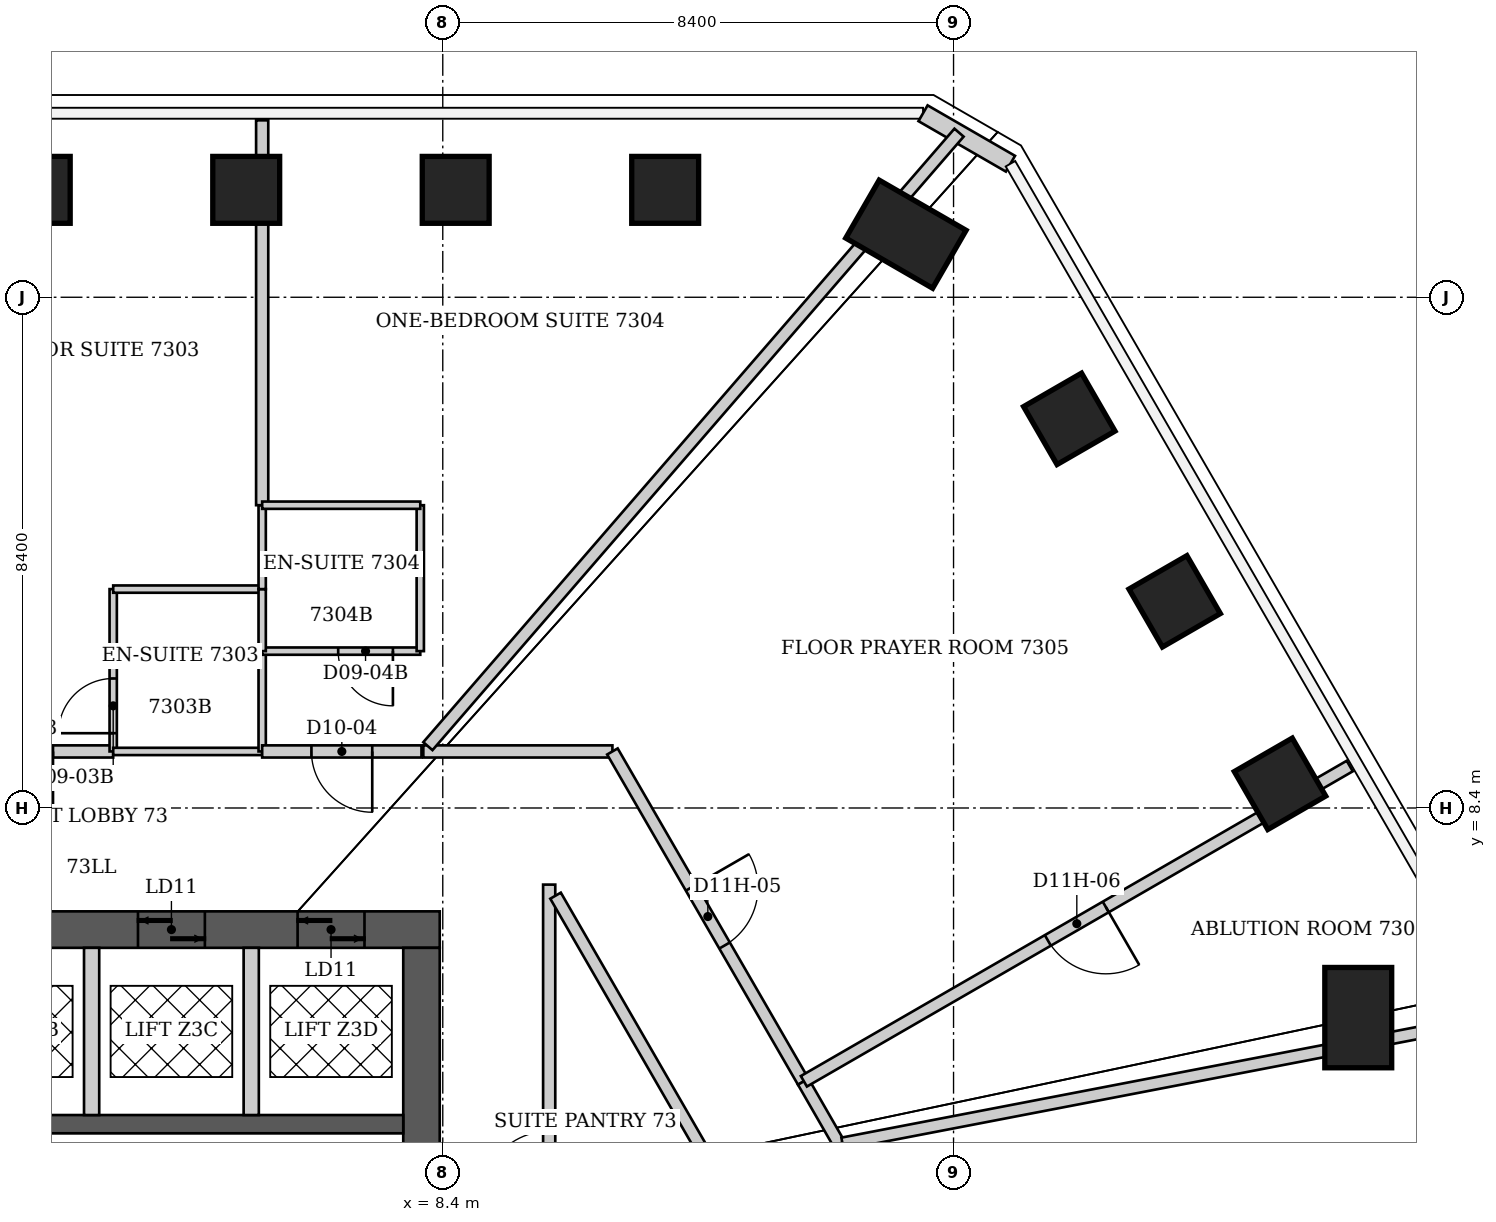
"""IFC4 building model, lengths in metres.
Left out: names, types, materials, properties, quantities, classifications, styles, units other than length and angle.
Written with IfcOpenShell. Run it as: python <this file> out.ifc"""

import sys

from ifc_helpers import new_model, si_unit, direction, frame, frame_2d, origin, origin_2d, place, context, subcontext, project, spatial, rectangle, extrude, element, fill, save


model = new_model("IFC4")
c1 = context("Model", 3, precision=1e-05, world=origin(), true_north=direction((0.0, 1.0)))
c2 = subcontext(c1, "Body", "Model", "MODEL_VIEW")
j1 = project(units=[si_unit("LENGTHUNIT", "METRE"), si_unit("PLANEANGLEUNIT", "RADIAN")], contexts=[c1])
p1 = place(None, origin())
s1 = spatial("IfcSite", under=j1, at=p1, CompositionType="ELEMENT")
p2 = place(p1, origin())
s2 = spatial("IfcBuilding", under=s1, at=p2, CompositionType="ELEMENT")
p3 = place(p2, frame((0.0, 0.0, 291.2)))
s3 = spatial("IfcBuildingStorey", under=s2, at=p3, CompositionType="ELEMENT", Elevation=291.2)
for number, where, z_axis, x_axis in (
    (1, (1.722, 18.566, 0.0), (0.0, 0.0, 1.0), (0.0, 1.0, 0.0)),
    (2, (5.167, 18.566, 0.0), (0.0, 0.0, 1.0), (0.0, 1.0, 0.0)),
    (3, (8.613, 18.566, 0.0), (0.0, 0.0, 1.0), (0.0, 1.0, 0.0)),
    (4, (12.058, 18.566, 0.0), (0.0, 0.0, 1.0), (0.0, 1.0, 0.0)),
):
    element("IfcColumn", number, at=place(p3, frame(where, z_axis=z_axis, x_axis=x_axis)), inside=s3, PredefinedType="COLUMN", context=c2, shape_type="SweptSolid", body=[
        extrude(rectangle(XDim=1.1, YDim=1.1, at=origin_2d()), origin(), (0.0, 0.0, 1.0), 3.8),
    ])
p4 = place(p3, frame((16.017, 17.837, 0.0), z_axis=(0.0, 0.0, 1.0), x_axis=(0.5, 0.866025403784, 0.0)))
e5 = element("IfcColumn", 5, at=p4, inside=s3, PredefinedType="COLUMN", context=c2, shape_type="SweptSolid", body=[
    extrude(rectangle(XDim=1.1, YDim=1.65, at=origin_2d()), origin(), (0.0, 0.0, 1.0), 3.8),
])
for number, where, z_axis, x_axis in (
    (6, (18.704, 14.8, 0.0), (0.0, 0.0, 1.0), (0.866, 0.5, 0.0)),
    (7, (20.437, 11.799, 0.0), (0.0, 0.0, 1.0), (0.866, 0.5, 0.0)),
    (8, (22.169, 8.798, 0.0), (0.0, 0.0, 1.0), (0.866, 0.5, 0.0)),
):
    element("IfcColumn", number, at=place(p3, frame(where, z_axis=z_axis, x_axis=x_axis)), inside=s3, PredefinedType="COLUMN", context=c2, shape_type="SweptSolid", body=[
        extrude(rectangle(XDim=1.1, YDim=1.1, at=origin_2d()), origin(), (0.0, 0.0, 1.0), 3.8),
    ])
p5 = place(p3, frame((23.456, 4.952, 0.0), z_axis=(0.0, 0.0, 1.0), x_axis=(1.0, 0.0, 0.0)))
e9 = element("IfcColumn", 9, at=p5, inside=s3, PredefinedType="COLUMN", context=c2, shape_type="SweptSolid", body=[
    extrude(rectangle(XDim=1.1, YDim=1.65, at=origin_2d()), origin(), (0.0, 0.0, 1.0), 3.8),
])
p6 = place(p3, frame((-8.35, 6.4, 0.0), z_axis=(0.0, 0.0, 1.0), x_axis=(1.0, 0.0, 0.0)))
e10 = element("IfcWall", 10, at=p6, inside=s3, PredefinedType="SHEAR", context=c2, shape_type="SweptSolid", body=[
    extrude(rectangle(XDim=16.7, YDim=0.6, at=frame_2d((8.35, 0.0))), origin(), (0.0, 0.0, 1.0), 3.8),
])
p7 = place(p6, frame((6.488, 0.0, 0.0)))
e11 = element("IfcOpeningElement", 11, at=p7, cuts=e10, PredefinedType="OPENING", context=c2, shape_type="SweptSolid", body=[
    extrude(rectangle(XDim=1.1, YDim=2.1, at=frame_2d((0.55, 1.05))), frame((0.0, 0.3, 0.0), z_axis=(0.0, -1.0, 0.0), x_axis=(1.0, 0.0, 0.0)), (0.0, 0.0, 1.0), 0.6),
])
p8 = place(p6, frame((9.113, 0.0, 0.0)))
e12 = element("IfcOpeningElement", 12, at=p8, cuts=e10, PredefinedType="OPENING", context=c2, shape_type="SweptSolid", body=[
    extrude(rectangle(XDim=1.1, YDim=2.1, at=frame_2d((0.55, 1.05))), frame((0.0, 0.3, 0.0), z_axis=(0.0, -1.0, 0.0), x_axis=(1.0, 0.0, 0.0)), (0.0, 0.0, 1.0), 0.6),
])
p9 = place(p6, frame((11.738, 0.0, 0.0)))
e13 = element("IfcOpeningElement", 13, at=p9, cuts=e10, PredefinedType="OPENING", context=c2, shape_type="SweptSolid", body=[
    extrude(rectangle(XDim=1.1, YDim=2.1, at=frame_2d((0.55, 1.05))), frame((0.0, 0.3, 0.0), z_axis=(0.0, -1.0, 0.0), x_axis=(1.0, 0.0, 0.0)), (0.0, 0.0, 1.0), 0.6),
])
p10 = place(p6, frame((14.363, 0.0, 0.0)))
e14 = element("IfcOpeningElement", 14, at=p10, cuts=e10, PredefinedType="OPENING", context=c2, shape_type="SweptSolid", body=[
    extrude(rectangle(XDim=1.1, YDim=2.1, at=frame_2d((0.55, 1.05))), frame((0.0, 0.3, 0.0), z_axis=(0.0, -1.0, 0.0), x_axis=(1.0, 0.0, 0.0)), (0.0, 0.0, 1.0), 0.6),
])
p11 = place(p3, frame((8.05, -6.1, 0.0), z_axis=(0.0, 0.0, 1.0), x_axis=(0.0, 1.0, 0.0)))
e15 = element("IfcWall", 15, at=p11, inside=s3, PredefinedType="SHEAR", context=c2, shape_type="SweptSolid", body=[
    extrude(rectangle(XDim=12.2, YDim=0.6, at=frame_2d((6.1, 0.0))), origin(), (0.0, 0.0, 1.0), 3.8),
])
p12 = place(p11, frame((7.6, 0.0, 0.0)))
e16 = element("IfcOpeningElement", 16, at=p12, cuts=e15, PredefinedType="OPENING", context=c2, shape_type="SweptSolid", body=[
    extrude(rectangle(XDim=1.2, YDim=2.2, at=frame_2d((0.6, 1.1))), frame((0.0, 0.3, 0.0), z_axis=(0.0, -1.0, 0.0), x_axis=(1.0, 0.0, 0.0)), (0.0, 0.0, 1.0), 0.6),
])
p13 = place(p3, frame((-7.75, 3.2, 0.0), z_axis=(0.0, 0.0, 1.0), x_axis=(1.0, 0.0, 0.0)))
e17 = element("IfcWall", 17, at=p13, inside=s3, PredefinedType="SHEAR", context=c2, shape_type="SweptSolid", body=[
    extrude(rectangle(XDim=15.5, YDim=0.3, at=frame_2d((7.75, 0.0))), origin(), (0.0, 0.0, 1.0), 3.8),
])
p14 = place(p13, frame((1.95, 0.0, 0.0)))
e18 = element("IfcOpeningElement", 18, at=p14, cuts=e17, PredefinedType="OPENING", context=c2, shape_type="SweptSolid", body=[
    extrude(rectangle(XDim=1.1, YDim=2.2, at=frame_2d((0.55, 1.1))), frame((0.0, 0.15, 0.0), z_axis=(0.0, -1.0, 0.0), x_axis=(1.0, 0.0, 0.0)), (0.0, 0.0, 1.0), 0.3),
])
for number, where, z_axis, x_axis in (
    (19, (2.625, 3.35, 0.0), (0.0, 0.0, 1.0), (0.0, 1.0, 0.0)),
    (20, (5.25, 3.35, 0.0), (0.0, 0.0, 1.0), (0.0, 1.0, 0.0)),
):
    element("IfcWall", number, at=place(p3, frame(where, z_axis=z_axis, x_axis=x_axis)), inside=s3, PredefinedType="PARTITIONING", context=c2, shape_type="SweptSolid", body=[
        extrude(rectangle(XDim=2.75, YDim=0.25, at=frame_2d((1.375, 0.0))), origin(), (0.0, 0.0, 1.0), 3.8),
    ])
p15 = place(p3, frame((16.298, 19.826, 0.0), z_axis=(0.0, 0.0, 1.0), x_axis=(0.866026405774, -0.499998264499, 0.0)))
e21 = element("IfcWall", 21, at=p15, inside=s3, PredefinedType="SOLIDWALL", context=c2, shape_type="SweptSolid", body=[
    extrude(rectangle(XDim=1.66, YDim=0.3, at=frame_2d((0.83, 0.0))), origin(), (0.0, 0.0, 1.0), 3.64),
])
p16 = place(p3, frame((2.98, 9.33, 0.0), z_axis=(0.0, 0.0, 1.0), x_axis=(-1.0, 0.0, 0.0)))
e22 = element("IfcWall", 22, at=p16, inside=s3, PredefinedType="PARTITIONING", context=c2, shape_type="SweptSolid", body=[
    extrude(rectangle(XDim=2.98, YDim=0.2, at=frame_2d((1.49, 0.0))), origin(), (0.0, 0.0, 1.0), 3.64),
])
p17 = place(p16, frame((0.99, 0.0, 0.0)))
e23 = element("IfcOpeningElement", 23, at=p17, cuts=e22, PredefinedType="OPENING", context=c2, shape_type="SweptSolid", body=[
    extrude(rectangle(XDim=1.0, YDim=2.13, at=frame_2d((0.5, 1.065))), frame((0.0, 0.1, 0.0), z_axis=(0.0, -1.0, 0.0), x_axis=(1.0, 0.0, 0.0)), (0.0, 0.0, 1.0), 0.2),
])
p18 = place(p3, frame((2.98, 12.0, 0.0), z_axis=(0.0, 0.0, 1.0), x_axis=(0.0, -1.0, 0.0)))
e24 = element("IfcWall", 24, at=p18, inside=s3, PredefinedType="PARTITIONING", context=c2, shape_type="SweptSolid", body=[
    extrude(rectangle(XDim=2.67, YDim=0.12, at=frame_2d((1.335, 0.0))), origin(), (0.0, 0.0, 1.0), 3.64),
])
p19 = place(p18, frame((1.47, 0.0, 0.0)))
e25 = element("IfcOpeningElement", 25, at=p19, cuts=e24, PredefinedType="OPENING", context=c2, shape_type="SweptSolid", body=[
    extrude(rectangle(XDim=0.9, YDim=2.03, at=frame_2d((0.45, 1.015))), frame((0.0, 0.06, 0.0), z_axis=(0.0, -1.0, 0.0), x_axis=(1.0, 0.0, 0.0)), (0.0, 0.0, 1.0), 0.12),
])
p20 = place(p3, frame((5.43, 9.33, 0.0), z_axis=(0.0, 0.0, 1.0), x_axis=(-1.0, 0.0, 0.0)))
e26 = element("IfcWall", 26, at=p20, inside=s3, PredefinedType="PARTITIONING", context=c2, shape_type="SweptSolid", body=[
    extrude(rectangle(XDim=2.45, YDim=0.12, at=frame_2d((1.225, 0.0))), origin(), (0.0, 0.0, 1.0), 3.64),
])
p21 = place(p3, frame((5.43, 10.98, 0.0), z_axis=(0.0, 0.0, 1.0), x_axis=(0.0, -1.0, 0.0)))
e27 = element("IfcWall", 27, at=p21, inside=s3, PredefinedType="PARTITIONING", context=c2, shape_type="SweptSolid", body=[
    extrude(rectangle(XDim=1.65, YDim=0.12, at=frame_2d((0.825, 0.0))), origin(), (0.0, 0.0, 1.0), 3.64),
])
p22 = place(p3, frame((5.43, 10.98, 0.0), z_axis=(0.0, 0.0, 1.0), x_axis=(1.0, 0.0, 0.0)))
e28 = element("IfcWall", 28, at=p22, inside=s3, PredefinedType="PARTITIONING", context=c2, shape_type="SweptSolid", body=[
    extrude(rectangle(XDim=2.6, YDim=0.12, at=frame_2d((1.3, 0.0))), origin(), (0.0, 0.0, 1.0), 3.64),
])
p23 = place(p22, frame((1.25, 0.0, 0.0)))
e29 = element("IfcOpeningElement", 29, at=p23, cuts=e28, PredefinedType="OPENING", context=c2, shape_type="SweptSolid", body=[
    extrude(rectangle(XDim=0.9, YDim=2.03, at=frame_2d((0.45, 1.015))), frame((0.0, 0.06, 0.0), z_axis=(0.0, -1.0, 0.0), x_axis=(1.0, 0.0, 0.0)), (0.0, 0.0, 1.0), 0.12),
])
p24 = place(p3, frame((5.43, 12.0, 0.0), z_axis=(0.0, 0.0, 1.0), x_axis=(-1.0, 0.0, 0.0)))
e30 = element("IfcWall", 30, at=p24, inside=s3, PredefinedType="PARTITIONING", context=c2, shape_type="SweptSolid", body=[
    extrude(rectangle(XDim=2.45, YDim=0.12, at=frame_2d((1.225, 0.0))), origin(), (0.0, 0.0, 1.0), 3.64),
])
p25 = place(p3, frame((5.43, 12.0, 0.0), z_axis=(0.0, 0.0, 1.0), x_axis=(0.0, -1.0, 0.0)))
e31 = element("IfcWall", 31, at=p25, inside=s3, PredefinedType="PARTITIONING", context=c2, shape_type="SweptSolid", body=[
    extrude(rectangle(XDim=1.02, YDim=0.12, at=frame_2d((0.51, 0.0))), origin(), (0.0, 0.0, 1.0), 3.64),
])
p26 = place(p3, frame((5.43, 13.38, 0.0), z_axis=(0.0, 0.0, 1.0), x_axis=(0.0, -1.0, 0.0)))
e32 = element("IfcWall", 32, at=p26, inside=s3, PredefinedType="PARTITIONING", context=c2, shape_type="SweptSolid", body=[
    extrude(rectangle(XDim=1.38, YDim=0.12, at=frame_2d((0.69, 0.0))), origin(), (0.0, 0.0, 1.0), 3.64),
])
p27 = place(p3, frame((5.43, 19.71, 0.0), z_axis=(0.0, 0.0, 1.0), x_axis=(0.0, -1.0, 0.0)))
e33 = element("IfcWall", 33, at=p27, inside=s3, PredefinedType="PARTITIONING", context=c2, shape_type="SweptSolid", body=[
    extrude(rectangle(XDim=6.33, YDim=0.2, at=frame_2d((3.165, 0.0))), origin(), (0.0, 0.0, 1.0), 3.64),
])
p28 = place(p3, frame((8.03, 10.98, 0.0), z_axis=(0.0, 0.0, 1.0), x_axis=(0.0, 1.0, 0.0)))
e34 = element("IfcWall", 34, at=p28, inside=s3, PredefinedType="PARTITIONING", context=c2, shape_type="SweptSolid", body=[
    extrude(rectangle(XDim=2.4, YDim=0.12, at=frame_2d((1.2, 0.0))), origin(), (0.0, 0.0, 1.0), 3.64),
])
p29 = place(p3, frame((8.03, 13.38, 0.0), z_axis=(0.0, 0.0, 1.0), x_axis=(-1.0, 0.0, 0.0)))
e35 = element("IfcWall", 35, at=p29, inside=s3, PredefinedType="PARTITIONING", context=c2, shape_type="SweptSolid", body=[
    extrude(rectangle(XDim=2.6, YDim=0.12, at=frame_2d((1.3, 0.0))), origin(), (0.0, 0.0, 1.0), 3.64),
])
p30 = place(p3, frame((8.05, 9.33, 0.0), z_axis=(0.0, 0.0, 1.0), x_axis=(-1.0, 0.0, 0.0)))
e36 = element("IfcWall", 36, at=p30, inside=s3, PredefinedType="PARTITIONING", context=c2, shape_type="SweptSolid", body=[
    extrude(rectangle(XDim=2.62, YDim=0.2, at=frame_2d((1.31, 0.0))), origin(), (0.0, 0.0, 1.0), 3.64),
])
p31 = place(p30, frame((0.81, 0.0, 0.0)))
e37 = element("IfcOpeningElement", 37, at=p31, cuts=e36, PredefinedType="OPENING", context=c2, shape_type="SweptSolid", body=[
    extrude(rectangle(XDim=1.0, YDim=2.13, at=frame_2d((0.5, 1.065))), frame((0.0, 0.1, 0.0), z_axis=(0.0, -1.0, 0.0), x_axis=(1.0, 0.0, 0.0)), (0.0, 0.0, 1.0), 0.2),
])
p32 = place(p3, frame((10.15, -2.07, 0.0), z_axis=(0.0, 0.0, 1.0), x_axis=(0.0, 1.0, 0.0)))
e38 = element("IfcWall", 38, at=p32, inside=s3, PredefinedType="PARTITIONING", context=c2, shape_type="SweptSolid", body=[
    extrude(rectangle(XDim=9.21, YDim=0.2, at=frame_2d((4.605, 0.0))), origin(), (0.0, 0.0, 1.0), 3.64),
])
p33 = place(p32, frame((4.055, 0.0, 0.0)))
e39 = element("IfcOpeningElement", 39, at=p33, cuts=e38, PredefinedType="OPENING", context=c2, shape_type="SweptSolid", body=[
    extrude(rectangle(XDim=1.1, YDim=2.2, at=frame_2d((0.55, 1.1))), frame((0.0, 0.1, 0.0), z_axis=(0.0, -1.0, 0.0), x_axis=(1.0, 0.0, 0.0)), (0.0, 0.0, 1.0), 0.2),
])
p34 = place(p3, frame((10.255, 6.958, 0.0), z_axis=(0.0, 0.0, 1.0), x_axis=(0.499806513108, -0.866137084678, 0.0)))
e40 = element("IfcWall", 40, at=p34, inside=s3, PredefinedType="PARTITIONING", context=c2, shape_type="SweptSolid", body=[
    extrude(rectangle(XDim=5.112, YDim=0.2, at=frame_2d((2.556, 0.0))), origin(), (0.0, 0.0, 1.0), 3.64),
])
p35 = place(p3, frame((11.19, 9.33, 0.0), z_axis=(0.0, 0.0, 1.0), x_axis=(-1.0, 0.0, 0.0)))
e41 = element("IfcWall", 41, at=p35, inside=s3, PredefinedType="PARTITIONING", context=c2, shape_type="SweptSolid", body=[
    extrude(rectangle(XDim=3.11, YDim=0.2, at=frame_2d((1.555, 0.0))), origin(), (0.0, 0.0, 1.0), 3.64),
])
p36 = place(p3, frame((11.19, 9.33, 0.0), z_axis=(0.0, 0.0, 1.0), x_axis=(0.500328823945, -0.865835473938, 0.0)))
e42 = element("IfcWall", 42, at=p36, inside=s3, PredefinedType="PARTITIONING", context=c2, shape_type="SweptSolid", body=[
    extrude(rectangle(XDim=6.273, YDim=0.2, at=frame_2d((3.136, 0.0))), origin(), (0.0, 0.0, 1.0), 3.64),
])
p37 = place(p36, frame((2.586, 0.0, 0.0)))
e43 = element("IfcOpeningElement", 43, at=p37, cuts=e42, PredefinedType="OPENING", context=c2, shape_type="SweptSolid", body=[
    extrude(rectangle(XDim=1.1, YDim=2.2, at=frame_2d((0.55, 1.1))), frame((0.0, 0.1, 0.0), z_axis=(0.0, -1.0, 0.0), x_axis=(1.0, 0.0, 0.0)), (0.0, 0.0, 1.0), 0.2),
])
p38 = place(p3, frame((14.328, 3.899, 0.0), z_axis=(0.0, 0.0, 1.0), x_axis=(0.498463393977, -0.866910747923, 0.0)))
e44 = element("IfcWall", 44, at=p38, inside=s3, PredefinedType="PARTITIONING", context=c2, shape_type="SweptSolid", body=[
    extrude(rectangle(XDim=1.187, YDim=0.2, at=frame_2d((0.593, 0.0))), origin(), (0.0, 0.0, 1.0), 3.64),
])
p39 = place(p3, frame((14.92, 2.87, 0.0), z_axis=(0.0, 0.0, 1.0), x_axis=(0.507290461451, -0.861775137562, 0.0)))
e45 = element("IfcWall", 45, at=p39, inside=s3, PredefinedType="PARTITIONING", context=c2, shape_type="SweptSolid", body=[
    extrude(rectangle(XDim=0.395, YDim=0.2, at=frame_2d((0.197, 0.0))), origin(), (0.0, 0.0, 1.0), 3.64),
])
p40 = place(p3, frame((16.89, 19.507, 0.0), z_axis=(0.0, 0.0, 1.0), x_axis=(-0.654509091565, -0.756054131037, 0.0)))
e46 = element("IfcWall", 46, at=p40, inside=s3, PredefinedType="PARTITIONING", context=c2, shape_type="SweptSolid", body=[
    extrude(rectangle(XDim=13.346, YDim=0.2, at=frame_2d((6.673, 0.0))), origin(), (0.0, 0.0, 1.0), 3.64),
])
p41 = place(p3, frame((23.316, 9.09, 0.0), z_axis=(0.0, 0.0, 1.0), x_axis=(-0.865947121586, -0.50013556424, 0.0)))
e47 = element("IfcWall", 47, at=p41, inside=s3, PredefinedType="PARTITIONING", context=c2, shape_type="SweptSolid", body=[
    extrude(rectangle(XDim=10.367, YDim=0.2, at=frame_2d((5.184, 0.0))), origin(), (0.0, 0.0, 1.0), 3.64),
])
p42 = place(p41, frame((4.634, 0.0, 0.0)))
e48 = element("IfcOpeningElement", 48, at=p42, cuts=e47, PredefinedType="OPENING", context=c2, shape_type="SweptSolid", body=[
    extrude(rectangle(XDim=1.1, YDim=2.2, at=frame_2d((0.55, 1.1))), frame((0.0, 0.1, 0.0), z_axis=(0.0, -1.0, 0.0), x_axis=(1.0, 0.0, 0.0)), (0.0, 0.0, 1.0), 0.2),
])
p43 = place(p3, frame((25.341, 4.874, 0.0), z_axis=(0.0, 0.0, 1.0), x_axis=(-0.982001168061, -0.188874841966, 0.0)))
e49 = element("IfcWall", 49, at=p43, inside=s3, PredefinedType="PARTITIONING", context=c2, shape_type="SweptSolid", body=[
    extrude(rectangle(XDim=10.557, YDim=0.2, at=frame_2d((5.278, 0.0))), origin(), (0.0, 0.0, 1.0), 3.64),
])
p44 = place(p17, origin())
e50 = element("IfcDoor", 50, at=p44, inside=s3, OperationType="SINGLE_SWING_LEFT", PredefinedType="DOOR", context=c2, shape_type="SweptSolid", body=[
    extrude(rectangle(XDim=1.0, YDim=2.13, at=frame_2d((0.5, 1.065))), frame((0.0, 0.025, 0.0), z_axis=(0.0, -1.0, 0.0), x_axis=(1.0, 0.0, 0.0)), (0.0, 0.0, 1.0), 0.05),
])
fill(e23, e50)
p45 = place(p19, origin())
e51 = element("IfcDoor", 51, at=p45, inside=s3, OperationType="SINGLE_SWING_RIGHT", PredefinedType="DOOR", context=c2, shape_type="SweptSolid", body=[
    extrude(rectangle(XDim=0.9, YDim=2.03, at=frame_2d((0.45, 1.015))), frame((0.0, 0.025, 0.0), z_axis=(0.0, -1.0, 0.0), x_axis=(1.0, 0.0, 0.0)), (0.0, 0.0, 1.0), 0.05),
])
fill(e25, e51)
p46 = place(p31, origin())
e52 = element("IfcDoor", 52, at=p46, inside=s3, OperationType="SINGLE_SWING_LEFT", PredefinedType="DOOR", context=c2, shape_type="SweptSolid", body=[
    extrude(rectangle(XDim=1.0, YDim=2.13, at=frame_2d((0.5, 1.065))), frame((0.0, 0.025, 0.0), z_axis=(0.0, -1.0, 0.0), x_axis=(1.0, 0.0, 0.0)), (0.0, 0.0, 1.0), 0.05),
])
fill(e37, e52)
p47 = place(p23, origin())
e53 = element("IfcDoor", 53, at=p47, inside=s3, OperationType="SINGLE_SWING_RIGHT", PredefinedType="DOOR", context=c2, shape_type="SweptSolid", body=[
    extrude(rectangle(XDim=0.9, YDim=2.03, at=frame_2d((0.45, 1.015))), frame((0.0, 0.025, 0.0), z_axis=(0.0, -1.0, 0.0), x_axis=(1.0, 0.0, 0.0)), (0.0, 0.0, 1.0), 0.05),
])
fill(e29, e53)
p48 = place(p37, origin())
e54 = element("IfcDoor", 54, at=p48, inside=s3, OperationType="SINGLE_SWING_LEFT", PredefinedType="DOOR", context=c2, shape_type="SweptSolid", body=[
    extrude(rectangle(XDim=1.1, YDim=2.2, at=frame_2d((0.55, 1.1))), frame((0.0, 0.025, 0.0), z_axis=(0.0, -1.0, 0.0), x_axis=(1.0, 0.0, 0.0)), (0.0, 0.0, 1.0), 0.05),
])
fill(e43, e54)
p49 = place(p42, origin())
e55 = element("IfcDoor", 55, at=p49, inside=s3, OperationType="SINGLE_SWING_LEFT", PredefinedType="DOOR", context=c2, shape_type="SweptSolid", body=[
    extrude(rectangle(XDim=1.1, YDim=2.2, at=frame_2d((0.55, 1.1))), frame((0.0, 0.025, 0.0), z_axis=(0.0, -1.0, 0.0), x_axis=(1.0, 0.0, 0.0)), (0.0, 0.0, 1.0), 0.05),
])
fill(e48, e55)
p50 = place(p33, origin())
e56 = element("IfcDoor", 56, at=p50, inside=s3, OperationType="SINGLE_SWING_LEFT", PredefinedType="DOOR", context=c2, shape_type="SweptSolid", body=[
    extrude(rectangle(XDim=1.1, YDim=2.2, at=frame_2d((0.55, 1.1))), frame((0.0, 0.025, 0.0), z_axis=(0.0, -1.0, 0.0), x_axis=(1.0, 0.0, 0.0)), (0.0, 0.0, 1.0), 0.05),
])
fill(e39, e56)
p51 = place(p9, origin())
e57 = element("IfcDoor", 57, at=p51, inside=s3, OperationType="DOUBLE_DOOR_SLIDING", PredefinedType="DOOR", context=c2, shape_type="SweptSolid", body=[
    extrude(rectangle(XDim=1.1, YDim=2.1, at=frame_2d((0.55, 1.05))), frame((0.0, 0.025, 0.0), z_axis=(0.0, -1.0, 0.0), x_axis=(1.0, 0.0, 0.0)), (0.0, 0.0, 1.0), 0.05),
])
fill(e13, e57)
p52 = place(p10, origin())
e58 = element("IfcDoor", 58, at=p52, inside=s3, OperationType="DOUBLE_DOOR_SLIDING", PredefinedType="DOOR", context=c2, shape_type="SweptSolid", body=[
    extrude(rectangle(XDim=1.1, YDim=2.1, at=frame_2d((0.55, 1.05))), frame((0.0, 0.025, 0.0), z_axis=(0.0, -1.0, 0.0), x_axis=(1.0, 0.0, 0.0)), (0.0, 0.0, 1.0), 0.05),
])
fill(e14, e58)
save(model, sys.argv[1])
